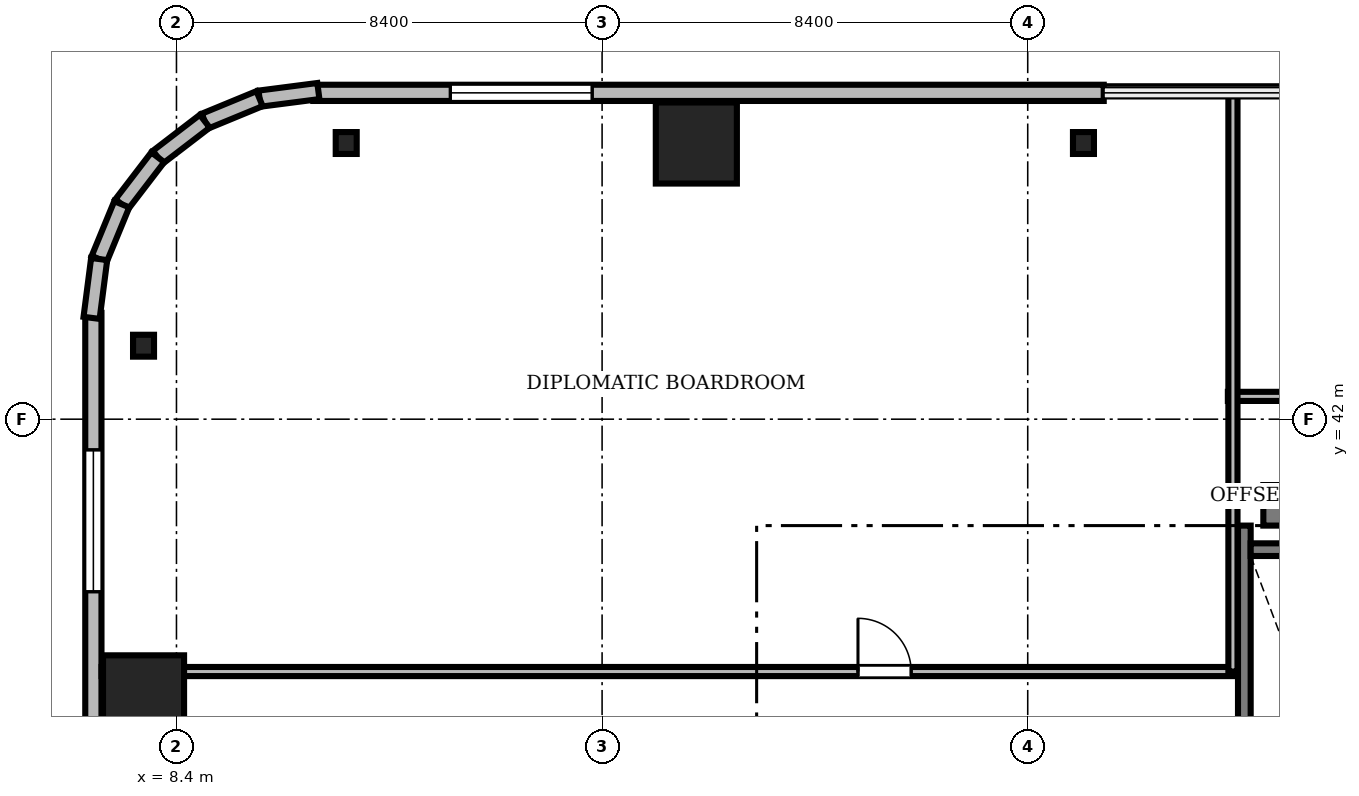
"""IFC4 building model, lengths in metres.
Left out: names, types, materials, properties, quantities, classifications, styles, units other than length and angle.
Written with IfcOpenShell. Run it as: python <this file> out.ifc"""

import sys

from ifc_helpers import new_model, si_unit, direction, frame, frame_2d, origin, origin_2d, place, context, subcontext, project, spatial, rectangle, i_section, extrude, source, transform, mapped, element, fill, save


model = new_model("IFC4")
c1 = context("Model", 3, precision=1e-05, world=origin(), true_north=direction((0.0, 1.0)))
c2 = subcontext(c1, "Body", "Model", "MODEL_VIEW")
j1 = project(units=[si_unit("LENGTHUNIT", "METRE"), si_unit("PLANEANGLEUNIT", "RADIAN")], contexts=[c1])
p1 = place(None, origin())
s1 = spatial("IfcSite", under=j1, at=p1, CompositionType="ELEMENT")
p2 = place(p1, origin())
s2 = spatial("IfcBuilding", under=s1, at=p2, CompositionType="ELEMENT")
p3 = place(p2, frame((0.0, 0.0, 111.3)))
s3 = spatial("IfcBuildingStorey", under=s2, at=p3, CompositionType="ELEMENT", Elevation=111.3)
m1 = source(origin(), c2, "Body", "SweptSolid", [
    extrude(rectangle(XDim=17.52, YDim=0.8, at=frame_2d((8.76, 0.0))), origin(), (0.0, 0.0, 1.0), 3.46),
])
p4 = place(p3, frame((29.85, 40.3, 0.0), z_axis=(0.0, 0.0, 1.0), x_axis=(1.0, 0.0, 0.0)))
e1 = element("IfcWall", 1, at=p4, inside=s3, PredefinedType="SHEAR", context=c2, shape_type="MappedRepresentation", body=[
    mapped(m1, transform((0.0, 0.0, 0.0), scale=1.0)),
])
m2 = source(origin(), c2, "Body", "SweptSolid", [
    extrude(rectangle(XDim=1.6, YDim=1.6, at=origin_2d()), origin(), (0.0, 0.0, 1.0), 3.46),
])
for number, where, z_axis, x_axis in (
    (2, (18.66, 47.45, 0.0), (0.0, 0.0, 1.0), (1.0, 0.0, 0.0)),
    (3, (7.75, 36.54, 0.0), (0.0, 0.0, 1.0), (1.0, 0.0, 0.0)),
):
    element("IfcColumn", number, at=place(p3, frame(where, z_axis=z_axis, x_axis=x_axis)), inside=s3, PredefinedType="COLUMN", context=c2, shape_type="MappedRepresentation", body=[
        mapped(m2, transform((0.0, 0.0, 0.0), scale=1.0)),
    ])
m3 = source(origin(), c2, "Body", "SweptSolid", [
    extrude(i_section(OverallWidth=0.414, OverallDepth=0.432, WebThickness=0.026, FlangeThickness=0.04, FilletRadius=0.015, at=origin_2d()), origin(), (0.0, 0.0, 1.0), 3.46),
])
for number, where, z_axis, x_axis in (
    (4, (26.3, 47.45, 0.0), (0.0, 0.0, 1.0), (1.0, 0.0, 0.0)),
    (5, (11.75, 47.45, 0.0), (0.0, 0.0, 1.0), (1.0, 0.0, 0.0)),
    (6, (7.75, 43.45, 0.0), (0.0, 0.0, 1.0), (1.0, 0.0, 0.0)),
):
    element("IfcColumn", number, at=place(p3, frame(where, z_axis=z_axis, x_axis=x_axis)), inside=s3, PredefinedType="COLUMN", context=c2, shape_type="MappedRepresentation", body=[
        mapped(m3, transform((0.0, 0.0, 0.0), scale=1.0)),
    ])
m4 = source(origin(), c2, "Body", "SweptSolid", [
    extrude(rectangle(XDim=15.6, YDim=0.32, at=frame_2d((7.8, 0.0))), origin(), (0.0, 0.0, 1.0), 3.46),
])
p5 = place(p3, frame((26.7, 48.44, 0.0), z_axis=(0.0, 0.0, 1.0), x_axis=(-1.0, 0.0, 0.0)))
e7 = element("IfcWall", 7, at=p5, inside=s3, PredefinedType="SOLIDWALL", context=c2, shape_type="MappedRepresentation", body=[
    mapped(m4, transform((0.0, 0.0, 0.0), scale=1.0)),
])
m5 = source(origin(), c2, "Body", "SweptSolid", [
    extrude(rectangle(XDim=2.8, YDim=2.4, at=frame_2d((1.4, 1.2))), frame((0.0, 0.17, 0.0), z_axis=(0.0, -1.0, 0.0), x_axis=(1.0, 0.0, 0.0)), (0.0, 0.0, 1.0), 0.34),
])
p6 = place(p5, frame((10.095, 0.0, 0.72)))
e8 = element("IfcOpeningElement", 8, at=p6, cuts=e7, PredefinedType="OPENING", context=c2, shape_type="MappedRepresentation", body=[
    mapped(m5, transform((0.0, 0.0, 0.0), scale=1.0)),
])
m6 = source(origin(), c2, "Body", "SweptSolid", [
    extrude(rectangle(XDim=15.6, YDim=0.32, at=frame_2d((7.8, 0.0))), origin(), (0.0, 0.0, 1.0), 3.46),
])
p7 = place(p3, frame((6.76, 44.1, 0.0), z_axis=(0.0, 0.0, 1.0), x_axis=(0.0, -1.0, 0.0)))
e9 = element("IfcWall", 9, at=p7, inside=s3, PredefinedType="SOLIDWALL", context=c2, shape_type="MappedRepresentation", body=[
    mapped(m6, transform((0.0, 0.0, 0.0), scale=1.0)),
])
m7 = source(origin(), c2, "Body", "SweptSolid", [
    extrude(rectangle(XDim=1.4, YDim=2.3, at=frame_2d((0.7, 1.15))), frame((0.0, 0.17, 0.0), z_axis=(0.0, -1.0, 0.0), x_axis=(1.0, 0.0, 0.0)), (0.0, 0.0, 1.0), 0.34),
])
p8 = place(p7, frame((9.61, 0.0, 0.0)))
e10 = element("IfcOpeningElement", 10, at=p8, cuts=e9, PredefinedType="OPENING", context=c2, shape_type="MappedRepresentation", body=[
    mapped(m7, transform((0.0, 0.0, 0.0), scale=1.0)),
])
p9 = place(p7, frame((2.705, 0.0, 0.72)))
e11 = element("IfcOpeningElement", 11, at=p9, cuts=e9, PredefinedType="OPENING", context=c2, shape_type="MappedRepresentation", body=[
    mapped(m5, transform((0.0, 0.0, 0.0), scale=1.0)),
])
m8 = source(origin(), c2, "Body", "SweptSolid", [
    extrude(rectangle(XDim=1.17, YDim=0.32, at=frame_2d((0.585, 0.0))), origin(), (0.0, 0.0, 1.0), 3.46),
])
p10 = place(p3, frame((11.2, 48.476, 0.0), z_axis=(0.0, 0.0, 1.0), x_axis=(-0.991735963317, -0.128295670475, 0.0)))
e12 = element("IfcWall", 12, at=p10, inside=s3, PredefinedType="SOLIDWALL", context=c2, shape_type="MappedRepresentation", body=[
    mapped(m8, transform((0.0, 0.0, 0.0), scale=1.0)),
])
m9 = source(origin(), c2, "Body", "SweptSolid", [
    extrude(rectangle(XDim=1.169, YDim=0.32, at=frame_2d((0.584, 0.0))), origin(), (0.0, 0.0, 1.0), 3.46),
])
p11 = place(p3, frame((10.04, 48.325, 0.0), z_axis=(0.0, 0.0, 1.0), x_axis=(-0.924552646638, -0.381054331552, 0.0)))
e13 = element("IfcWall", 13, at=p11, inside=s3, PredefinedType="SOLIDWALL", context=c2, shape_type="MappedRepresentation", body=[
    mapped(m9, transform((0.0, 0.0, 0.0), scale=1.0)),
])
m10 = source(origin(), c2, "Body", "SweptSolid", [
    extrude(rectangle(XDim=1.169, YDim=0.32, at=frame_2d((0.584, 0.0))), origin(), (0.0, 0.0, 1.0), 3.46),
])
p12 = place(p3, frame((8.959, 47.88, 0.0), z_axis=(0.0, 0.0, 1.0), x_axis=(-0.793663520347, -0.608356981114, 0.0)))
e14 = element("IfcWall", 14, at=p12, inside=s3, PredefinedType="SOLIDWALL", context=c2, shape_type="MappedRepresentation", body=[
    mapped(m10, transform((0.0, 0.0, 0.0), scale=1.0)),
])
m11 = source(origin(), c2, "Body", "SweptSolid", [
    extrude(rectangle(XDim=1.169, YDim=0.32, at=frame_2d((0.584, 0.0))), origin(), (0.0, 0.0, 1.0), 3.46),
])
p13 = place(p3, frame((8.031, 47.169, 0.0), z_axis=(0.0, 0.0, 1.0), x_axis=(-0.608387696831, -0.793639975269, 0.0)))
e15 = element("IfcWall", 15, at=p13, inside=s3, PredefinedType="SOLIDWALL", context=c2, shape_type="MappedRepresentation", body=[
    mapped(m11, transform((0.0, 0.0, 0.0), scale=1.0)),
])
p14 = place(p3, frame((7.32, 46.241, 0.0), z_axis=(0.0, 0.0, 1.0), x_axis=(-0.381054331552, -0.924552646638, 0.0)))
e16 = element("IfcWall", 16, at=p14, inside=s3, PredefinedType="SOLIDWALL", context=c2, shape_type="MappedRepresentation", body=[
    mapped(m9, transform((0.0, 0.0, 0.0), scale=1.0)),
])
p15 = place(p3, frame((6.875, 45.16, 0.0), z_axis=(0.0, 0.0, 1.0), x_axis=(-0.128295670475, -0.991735963317, 0.0)))
e17 = element("IfcWall", 17, at=p15, inside=s3, PredefinedType="SOLIDWALL", context=c2, shape_type="MappedRepresentation", body=[
    mapped(m8, transform((0.0, 0.0, 0.0), scale=1.0)),
])
m12 = source(origin(), c2, "Body", "SweptSolid", [
    extrude(rectangle(XDim=9.25, YDim=0.25, at=frame_2d((4.625, 0.0))), origin(), (0.0, 0.0, 1.0), 3.5),
])
p16 = place(p3, frame((29.475, 30.65, 0.0), z_axis=(0.0, 0.0, 1.0), x_axis=(0.0, 1.0, 0.0)))
e18 = element("IfcWall", 18, at=p16, inside=s3, PredefinedType="SOLIDWALL", context=c2, shape_type="MappedRepresentation", body=[
    mapped(m12, transform((0.0, 0.0, 0.0), scale=1.0)),
])
m13 = source(origin(), c2, "Body", "SweptSolid", [
    extrude(rectangle(XDim=3.15, YDim=0.25, at=frame_2d((1.575, 0.0))), origin(), (0.0, 0.0, 1.0), 3.5),
])
p17 = place(p3, frame((29.6, 39.425, 0.0), z_axis=(0.0, 0.0, 1.0), x_axis=(1.0, 0.0, 0.0)))
e19 = element("IfcWall", 19, at=p17, inside=s3, PredefinedType="SOLIDWALL", context=c2, shape_type="MappedRepresentation", body=[
    mapped(m13, transform((0.0, 0.0, 0.0), scale=1.0)),
])
m14 = source(origin(), c2, "Body", "SweptSolid", [
    extrude(rectangle(XDim=23.928, YDim=0.18, at=frame_2d((11.964, 0.0))), origin(), (0.0, 0.0, 1.0), 2.702),
])
p18 = place(p3, frame((29.15, 42.45, 0.0), z_axis=(0.0, 0.0, 1.0), x_axis=(1.0, 0.0, 0.0)))
e20 = element("IfcWall", 20, at=p18, inside=s3, PredefinedType="PARTITIONING", context=c2, shape_type="MappedRepresentation", body=[
    mapped(m14, transform((0.0, 0.0, 0.0), scale=1.0)),
])
m15 = source(origin(), c2, "Body", "SweptSolid", [
    extrude(rectangle(XDim=1.05, YDim=2.2, at=frame_2d((0.525, 1.1))), frame((0.0, 0.1, 0.0), z_axis=(0.0, -1.0, 0.0), x_axis=(1.0, 0.0, 0.0)), (0.0, 0.0, 1.0), 0.2),
])
p19 = place(p18, frame((4.5, 0.0, 0.0)))
e21 = element("IfcOpeningElement", 21, at=p19, cuts=e20, PredefinedType="OPENING", context=c2, shape_type="MappedRepresentation", body=[
    mapped(m15, transform((0.0, 0.0, 0.0), scale=1.0)),
])
m16 = source(origin(), c2, "Body", "SweptSolid", [
    extrude(rectangle(XDim=22.328, YDim=0.18, at=frame_2d((11.164, 0.0))), origin(), (0.0, 0.0, 1.0), 2.702),
])
p20 = place(p3, frame((6.922, 37.02, 0.0), z_axis=(0.0, 0.0, 1.0), x_axis=(1.0, 0.0, 0.0)))
e22 = element("IfcWall", 22, at=p20, inside=s3, PredefinedType="PARTITIONING", context=c2, shape_type="MappedRepresentation", body=[
    mapped(m16, transform((0.0, 0.0, 0.0), scale=1.0)),
])
p21 = place(p20, frame((14.928, 0.0, 0.0)))
e23 = element("IfcOpeningElement", 23, at=p21, cuts=e22, PredefinedType="OPENING", context=c2, shape_type="MappedRepresentation", body=[
    mapped(m15, transform((0.0, 0.0, 0.0), scale=1.0)),
])
m17 = source(origin(), c2, "Body", "SweptSolid", [
    extrude(rectangle(XDim=11.45, YDim=0.18, at=frame_2d((5.725, 0.0))), origin(), (0.0, 0.0, 1.0), 2.702),
])
p22 = place(p3, frame((29.25, 37.02, 0.0), z_axis=(0.0, 0.0, 1.0), x_axis=(0.0, 1.0, 0.0)))
e24 = element("IfcWall", 24, at=p22, inside=s3, PredefinedType="PARTITIONING", context=c2, shape_type="MappedRepresentation", body=[
    mapped(m17, transform((0.0, 0.0, 0.0), scale=1.0)),
])
m18 = source(origin(), c2, "Body", "SweptSolid", [
    extrude(rectangle(XDim=2.8, YDim=2.4, at=frame_2d((1.4, 1.2))), frame((0.0, 0.03, 0.0), z_axis=(0.0, -1.0, 0.0), x_axis=(1.0, 0.0, 0.0)), (0.0, 0.0, 1.0), 0.06),
])
p23 = place(p6, origin())
e25 = element("IfcWindow", 25, at=p23, inside=s3, PartitioningType="SINGLE_PANEL", PredefinedType="WINDOW", context=c2, shape_type="MappedRepresentation", body=[
    mapped(m18, transform((0.0, 0.0, 0.0), scale=1.0)),
])
fill(e8, e25)
p24 = place(p9, origin())
e26 = element("IfcWindow", 26, at=p24, inside=s3, PartitioningType="SINGLE_PANEL", PredefinedType="WINDOW", context=c2, shape_type="MappedRepresentation", body=[
    mapped(m18, transform((0.0, 0.0, 0.0), scale=1.0)),
])
fill(e11, e26)
m19 = source(origin(), c2, "Body", "SweptSolid", [
    extrude(rectangle(XDim=1.05, YDim=2.2, at=frame_2d((0.525, 1.1))), frame((0.0, 0.025, 0.0), z_axis=(0.0, -1.0, 0.0), x_axis=(1.0, 0.0, 0.0)), (0.0, 0.0, 1.0), 0.05),
])
p25 = place(p21, origin())
e27 = element("IfcDoor", 27, at=p25, inside=s3, OperationType="SINGLE_SWING_LEFT", PredefinedType="DOOR", context=c2, shape_type="MappedRepresentation", body=[
    mapped(m19, transform((0.0, 0.0, 0.0), scale=1.0)),
])
fill(e23, e27)
save(model, sys.argv[1])
